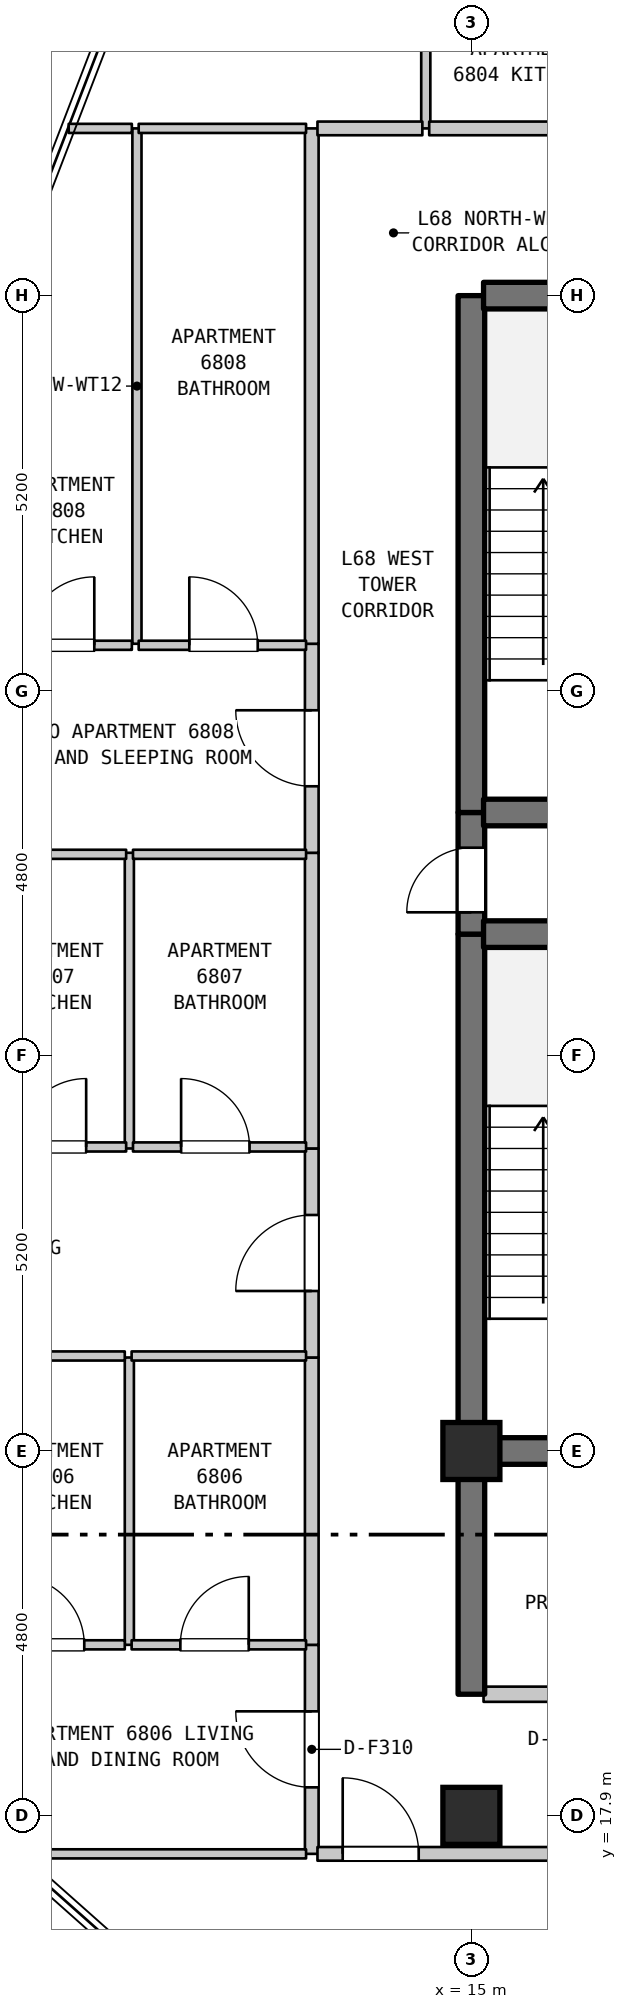
"""IFC4 building model, lengths in metres.
Left out: names, types, materials, properties, quantities, classifications, styles, units other than length and angle.
Written with IfcOpenShell. Run it as: python <this file> out.ifc"""

import sys

from ifc_helpers import new_model, si_unit, direction, frame, frame_2d, origin, origin_2d, place, context, subcontext, project, spatial, rectangle, extrude, element, fill, save


model = new_model("IFC4")
c1 = context("Model", 3, precision=1e-05, world=origin(), true_north=direction((0.0, 1.0)))
c2 = subcontext(c1, "Body", "Model", "MODEL_VIEW")
j1 = project(units=[si_unit("LENGTHUNIT", "METRE"), si_unit("PLANEANGLEUNIT", "RADIAN")], contexts=[c1])
p1 = place(None, origin())
s1 = spatial("IfcSite", under=j1, at=p1, CompositionType="ELEMENT")
p2 = place(p1, origin())
s2 = spatial("IfcBuilding", under=s1, at=p2, CompositionType="ELEMENT")
p3 = place(p2, frame((0.0, 0.0, 273.2)))
s3 = spatial("IfcBuildingStorey", under=s2, at=p3, CompositionType="ELEMENT", Elevation=273.2)
for number, where, z_axis, x_axis in (
    (1, (15.0, 17.9, 0.0), (0.0, 0.0, 1.0), (1.0, 0.0, 0.0)),
    (2, (15.0, 22.7, 0.0), (0.0, 0.0, 1.0), (1.0, 0.0, 0.0)),
):
    element("IfcColumn", number, at=place(p3, frame(where, z_axis=z_axis, x_axis=x_axis)), inside=s3, PredefinedType="COLUMN", context=c2, shape_type="SweptSolid", body=[
        extrude(rectangle(XDim=0.75, YDim=0.75, at=origin_2d()), origin(), (0.0, 0.0, 1.0), 3.7),
    ])
p4 = place(p3, frame((10.5, 20.15, 0.0), z_axis=(0.0, 0.0, 1.0), x_axis=(0.0, 1.0, 0.0)))
e3 = element("IfcWall", 3, at=p4, inside=s3, PredefinedType="PARTITIONING", context=c2, shape_type="SweptSolid", body=[
    extrude(rectangle(XDim=3.78, YDim=0.12, at=frame_2d((1.89, 0.0))), origin(), (0.0, 0.0, 1.0), 3.39),
])
p5 = place(p3, frame((10.5, 26.68, 0.0), z_axis=(0.0, 0.0, 1.0), x_axis=(0.0, 1.0, 0.0)))
e4 = element("IfcWall", 4, at=p5, inside=s3, PredefinedType="PARTITIONING", context=c2, shape_type="SweptSolid", body=[
    extrude(rectangle(XDim=3.89, YDim=0.12, at=frame_2d((1.945, 0.0))), origin(), (0.0, 0.0, 1.0), 3.39),
])
p6 = place(p3, frame((10.6, 33.32, 0.0), z_axis=(0.0, 0.0, 1.0), x_axis=(0.0, 1.0, 0.0)))
e5 = element("IfcWall", 5, at=p6, inside=s3, PredefinedType="PARTITIONING", context=c2, shape_type="SweptSolid", body=[
    extrude(rectangle(XDim=6.78, YDim=0.12, at=frame_2d((3.39, 0.0))), origin(), (0.0, 0.0, 1.0), 3.39),
])
p7 = place(p3, frame((12.9, 17.4, 0.0), z_axis=(0.0, 0.0, 1.0), x_axis=(0.0, 1.0, 0.0)))
e6 = element("IfcWall", 6, at=p7, inside=s3, PredefinedType="STANDARD", context=c2, shape_type="SweptSolid", body=[
    extrude(rectangle(XDim=2.75, YDim=0.18, at=frame_2d((1.375, 0.0))), origin(), (0.0, 0.0, 1.0), 3.39),
])
p8 = place(p7, frame((0.875, 0.0, 0.0)))
e7 = element("IfcOpeningElement", 7, at=p8, cuts=e6, PredefinedType="OPENING", context=c2, shape_type="SweptSolid", body=[
    extrude(rectangle(XDim=1.0, YDim=2.15, at=frame_2d((0.5, 1.075))), frame((0.0, 0.1, 0.0), z_axis=(0.0, -1.0, 0.0), x_axis=(1.0, 0.0, 0.0)), (0.0, 0.0, 1.0), 0.2),
])
p9 = place(p3, frame((12.9, 20.15, 0.0), z_axis=(0.0, 0.0, 1.0), x_axis=(0.0, 1.0, 0.0)))
e8 = element("IfcWall", 8, at=p9, inside=s3, PredefinedType="STANDARD", context=c2, shape_type="SweptSolid", body=[
    extrude(rectangle(XDim=3.78, YDim=0.18, at=frame_2d((1.89, 0.0))), origin(), (0.0, 0.0, 1.0), 3.39),
])
p10 = place(p3, frame((12.9, 23.93, 0.0), z_axis=(0.0, 0.0, 1.0), x_axis=(0.0, 1.0, 0.0)))
e9 = element("IfcWall", 9, at=p10, inside=s3, PredefinedType="STANDARD", context=c2, shape_type="SweptSolid", body=[
    extrude(rectangle(XDim=2.75, YDim=0.18, at=frame_2d((1.375, 0.0))), origin(), (0.0, 0.0, 1.0), 3.39),
])
p11 = place(p10, frame((0.875, 0.0, 0.0)))
e10 = element("IfcOpeningElement", 10, at=p11, cuts=e9, PredefinedType="OPENING", context=c2, shape_type="SweptSolid", body=[
    extrude(rectangle(XDim=1.0, YDim=2.15, at=frame_2d((0.5, 1.075))), frame((0.0, 0.1, 0.0), z_axis=(0.0, -1.0, 0.0), x_axis=(1.0, 0.0, 0.0)), (0.0, 0.0, 1.0), 0.2),
])
p12 = place(p3, frame((12.9, 26.68, 0.0), z_axis=(0.0, 0.0, 1.0), x_axis=(0.0, 1.0, 0.0)))
e11 = element("IfcWall", 11, at=p12, inside=s3, PredefinedType="STANDARD", context=c2, shape_type="SweptSolid", body=[
    extrude(rectangle(XDim=3.89, YDim=0.18, at=frame_2d((1.945, 0.0))), origin(), (0.0, 0.0, 1.0), 3.39),
])
p13 = place(p3, frame((12.9, 30.57, 0.0), z_axis=(0.0, 0.0, 1.0), x_axis=(0.0, 1.0, 0.0)))
e12 = element("IfcWall", 12, at=p13, inside=s3, PredefinedType="STANDARD", context=c2, shape_type="SweptSolid", body=[
    extrude(rectangle(XDim=2.75, YDim=0.18, at=frame_2d((1.375, 0.0))), origin(), (0.0, 0.0, 1.0), 3.39),
])
p14 = place(p13, frame((0.875, 0.0, 0.0)))
e13 = element("IfcOpeningElement", 13, at=p14, cuts=e12, PredefinedType="OPENING", context=c2, shape_type="SweptSolid", body=[
    extrude(rectangle(XDim=1.0, YDim=2.15, at=frame_2d((0.5, 1.075))), frame((0.0, 0.1, 0.0), z_axis=(0.0, -1.0, 0.0), x_axis=(1.0, 0.0, 0.0)), (0.0, 0.0, 1.0), 0.2),
])
p15 = place(p3, frame((12.9, 33.32, 0.0), z_axis=(0.0, 0.0, 1.0), x_axis=(0.0, 1.0, 0.0)))
e14 = element("IfcWall", 14, at=p15, inside=s3, PredefinedType="STANDARD", context=c2, shape_type="SweptSolid", body=[
    extrude(rectangle(XDim=6.78, YDim=0.18, at=frame_2d((3.39, 0.0))), origin(), (0.0, 0.0, 1.0), 3.39),
])
p16 = place(p3, frame((14.4, 40.1, 0.0), z_axis=(0.0, 0.0, 1.0), x_axis=(0.0, 1.0, 0.0)))
e15 = element("IfcWall", 15, at=p16, inside=s3, PredefinedType="PARTITIONING", context=c2, shape_type="SweptSolid", body=[
    extrude(rectangle(XDim=2.3, YDim=0.12, at=frame_2d((1.15, 0.0))), origin(), (0.0, 0.0, 1.0), 3.39),
])
p17 = place(p3, frame((15.0, 19.5, 0.0), z_axis=(0.0, 0.0, 1.0), x_axis=(0.0, 1.0, 0.0)))
e16 = element("IfcWall", 16, at=p17, inside=s3, PredefinedType="SHEAR", context=c2, shape_type="SweptSolid", body=[
    extrude(rectangle(XDim=3.2, YDim=0.35, at=frame_2d((1.6, 0.0))), origin(), (0.0, 0.0, 1.0), 3.39),
])
p18 = place(p3, frame((15.0, 22.7, 0.0), z_axis=(0.0, 0.0, 1.0), x_axis=(0.0, 1.0, 0.0)))
e17 = element("IfcWall", 17, at=p18, inside=s3, PredefinedType="SHEAR", context=c2, shape_type="SweptSolid", body=[
    extrude(rectangle(XDim=6.8, YDim=0.35, at=frame_2d((3.4, 0.0))), origin(), (0.0, 0.0, 1.0), 3.39),
])
p19 = place(p3, frame((15.0, 29.5, 0.0), z_axis=(0.0, 0.0, 1.0), x_axis=(0.0, 1.0, 0.0)))
e18 = element("IfcWall", 18, at=p19, inside=s3, PredefinedType="SHEAR", context=c2, shape_type="SweptSolid", body=[
    extrude(rectangle(XDim=1.6, YDim=0.35, at=frame_2d((0.8, 0.0))), origin(), (0.0, 0.0, 1.0), 3.39),
])
p20 = place(p19, frame((0.287, 0.0, 0.0)))
e19 = element("IfcOpeningElement", 19, at=p20, cuts=e18, PredefinedType="OPENING", context=c2, shape_type="SweptSolid", body=[
    extrude(rectangle(XDim=0.85, YDim=2.1, at=frame_2d((0.425, 1.05))), frame((0.0, 0.185, 0.0), z_axis=(0.0, -1.0, 0.0), x_axis=(1.0, 0.0, 0.0)), (0.0, 0.0, 1.0), 0.37),
])
p21 = place(p3, frame((15.0, 31.1, 0.0), z_axis=(0.0, 0.0, 1.0), x_axis=(0.0, 1.0, 0.0)))
e20 = element("IfcWall", 20, at=p21, inside=s3, PredefinedType="SHEAR", context=c2, shape_type="SweptSolid", body=[
    extrude(rectangle(XDim=6.8, YDim=0.35, at=frame_2d((3.4, 0.0))), origin(), (0.0, 0.0, 1.0), 3.39),
])
p22 = place(p3, frame((8.973, 17.4, 0.0), z_axis=(0.0, 0.0, 1.0), x_axis=(1.0, 0.0, 0.0)))
e21 = element("IfcWall", 21, at=p22, inside=s3, PredefinedType="PARTITIONING", context=c2, shape_type="SweptSolid", body=[
    extrude(rectangle(XDim=3.852, YDim=0.12, at=frame_2d((1.926, 0.0))), origin(), (0.0, 0.0, 1.0), 3.39),
])
p23 = place(p3, frame((12.975, 17.4, 0.0), z_axis=(0.0, 0.0, 1.0), x_axis=(1.0, 0.0, 0.0)))
e22 = element("IfcWall", 22, at=p23, inside=s3, PredefinedType="STANDARD", context=c2, shape_type="SweptSolid", body=[
    extrude(rectangle(XDim=3.18, YDim=0.18, at=frame_2d((1.59, 0.0))), origin(), (0.0, 0.0, 1.0), 3.39),
])
p24 = place(p23, frame((0.332, 0.0, 0.0)))
e23 = element("IfcOpeningElement", 23, at=p24, cuts=e22, PredefinedType="OPENING", context=c2, shape_type="SweptSolid", body=[
    extrude(rectangle(XDim=1.0, YDim=2.15, at=frame_2d((0.5, 1.075))), frame((0.0, 0.1, 0.0), z_axis=(0.0, -1.0, 0.0), x_axis=(1.0, 0.0, 0.0)), (0.0, 0.0, 1.0), 0.2),
])
p25 = place(p3, frame((15.16, 19.5, 0.0), z_axis=(0.0, 0.0, 1.0), x_axis=(1.0, 0.0, 0.0)))
e24 = element("IfcWall", 24, at=p25, inside=s3, PredefinedType="STANDARD", context=c2, shape_type="SweptSolid", body=[
    extrude(rectangle(XDim=3.68, YDim=0.2, at=frame_2d((1.84, 0.0))), origin(), (0.0, 0.0, 1.0), 3.39),
])
p26 = place(p25, frame((1.39, 0.0, 0.0)))
e25 = element("IfcOpeningElement", 25, at=p26, cuts=e24, PredefinedType="OPENING", context=c2, shape_type="SweptSolid", body=[
    extrude(rectangle(XDim=0.9, YDim=2.15, at=frame_2d((0.45, 1.075))), frame((0.0, 0.11, 0.0), z_axis=(0.0, -1.0, 0.0), x_axis=(1.0, 0.0, 0.0)), (0.0, 0.0, 1.0), 0.22),
])
p27 = place(p3, frame((8.473, 20.15, 0.0), z_axis=(0.0, 0.0, 1.0), x_axis=(1.0, 0.0, 0.0)))
e26 = element("IfcWall", 26, at=p27, inside=s3, PredefinedType="PARTITIONING", context=c2, shape_type="SweptSolid", body=[
    extrude(rectangle(XDim=1.967, YDim=0.12, at=frame_2d((0.983, 0.0))), origin(), (0.0, 0.0, 1.0), 3.39),
])
p28 = place(p27, frame((0.534, 0.0, 0.0)))
e27 = element("IfcOpeningElement", 27, at=p28, cuts=e26, PredefinedType="OPENING", context=c2, shape_type="SweptSolid", body=[
    extrude(rectangle(XDim=0.9, YDim=2.15, at=frame_2d((0.45, 1.075))), frame((0.0, 0.07, 0.0), z_axis=(0.0, -1.0, 0.0), x_axis=(1.0, 0.0, 0.0)), (0.0, 0.0, 1.0), 0.14),
])
p29 = place(p3, frame((10.53, 20.15, 0.0), z_axis=(0.0, 0.0, 1.0), x_axis=(1.0, 0.0, 0.0)))
e28 = element("IfcWall", 28, at=p29, inside=s3, PredefinedType="PARTITIONING", context=c2, shape_type="SweptSolid", body=[
    extrude(rectangle(XDim=2.295, YDim=0.12, at=frame_2d((1.147, 0.0))), origin(), (0.0, 0.0, 1.0), 3.39),
])
p30 = place(p29, frame((0.641, 0.0, 0.0)))
e29 = element("IfcOpeningElement", 29, at=p30, cuts=e28, PredefinedType="OPENING", context=c2, shape_type="SweptSolid", body=[
    extrude(rectangle(XDim=0.9, YDim=2.1, at=frame_2d((0.45, 1.05))), frame((0.0, 0.07, 0.0), z_axis=(0.0, -1.0, 0.0), x_axis=(1.0, 0.0, 0.0)), (0.0, 0.0, 1.0), 0.14),
])
p31 = place(p3, frame((15.16, 22.7, 0.0), z_axis=(0.0, 0.0, 1.0), x_axis=(1.0, 0.0, 0.0)))
e30 = element("IfcWall", 30, at=p31, inside=s3, PredefinedType="SHEAR", context=c2, shape_type="SweptSolid", body=[
    extrude(rectangle(XDim=3.68, YDim=0.35, at=frame_2d((1.84, 0.0))), origin(), (0.0, 0.0, 1.0), 3.39),
])
p32 = place(p3, frame((8.473, 23.95, 0.0), z_axis=(0.0, 0.0, 1.0), x_axis=(1.0, 0.0, 0.0)))
e31 = element("IfcWall", 31, at=p32, inside=s3, PredefinedType="PARTITIONING", context=c2, shape_type="SweptSolid", body=[
    extrude(rectangle(XDim=1.967, YDim=0.12, at=frame_2d((0.983, 0.0))), origin(), (0.0, 0.0, 1.0), 3.39),
])
p33 = place(p3, frame((10.53, 23.95, 0.0), z_axis=(0.0, 0.0, 1.0), x_axis=(1.0, 0.0, 0.0)))
e32 = element("IfcWall", 32, at=p33, inside=s3, PredefinedType="PARTITIONING", context=c2, shape_type="SweptSolid", body=[
    extrude(rectangle(XDim=2.295, YDim=0.12, at=frame_2d((1.147, 0.0))), origin(), (0.0, 0.0, 1.0), 3.39),
])
p34 = place(p3, frame((8.506, 26.7, 0.0), z_axis=(0.0, 0.0, 1.0), x_axis=(1.0, 0.0, 0.0)))
e33 = element("IfcWall", 33, at=p34, inside=s3, PredefinedType="PARTITIONING", context=c2, shape_type="SweptSolid", body=[
    extrude(rectangle(XDim=1.952, YDim=0.12, at=frame_2d((0.976, 0.0))), origin(), (0.0, 0.0, 1.0), 3.39),
])
p35 = place(p34, frame((0.526, 0.0, 0.0)))
e34 = element("IfcOpeningElement", 34, at=p35, cuts=e33, PredefinedType="OPENING", context=c2, shape_type="SweptSolid", body=[
    extrude(rectangle(XDim=0.9, YDim=2.15, at=frame_2d((0.45, 1.075))), frame((0.0, 0.07, 0.0), z_axis=(0.0, -1.0, 0.0), x_axis=(1.0, 0.0, 0.0)), (0.0, 0.0, 1.0), 0.14),
])
p36 = place(p3, frame((10.548, 26.7, 0.0), z_axis=(0.0, 0.0, 1.0), x_axis=(1.0, 0.0, 0.0)))
e35 = element("IfcWall", 35, at=p36, inside=s3, PredefinedType="PARTITIONING", context=c2, shape_type="SweptSolid", body=[
    extrude(rectangle(XDim=2.277, YDim=0.12, at=frame_2d((1.138, 0.0))), origin(), (0.0, 0.0, 1.0), 3.39),
])
p37 = place(p36, frame((0.633, 0.0, 0.0)))
e36 = element("IfcOpeningElement", 36, at=p37, cuts=e35, PredefinedType="OPENING", context=c2, shape_type="SweptSolid", body=[
    extrude(rectangle(XDim=0.9, YDim=2.1, at=frame_2d((0.45, 1.05))), frame((0.0, 0.07, 0.0), z_axis=(0.0, -1.0, 0.0), x_axis=(1.0, 0.0, 0.0)), (0.0, 0.0, 1.0), 0.14),
])
p38 = place(p3, frame((15.16, 29.5, 0.0), z_axis=(0.0, 0.0, 1.0), x_axis=(1.0, 0.0, 0.0)))
e37 = element("IfcWall", 37, at=p38, inside=s3, PredefinedType="SHEAR", context=c2, shape_type="SweptSolid", body=[
    extrude(rectangle(XDim=3.68, YDim=0.35, at=frame_2d((1.84, 0.0))), origin(), (0.0, 0.0, 1.0), 3.39),
])
p39 = place(p3, frame((8.506, 30.55, 0.0), z_axis=(0.0, 0.0, 1.0), x_axis=(1.0, 0.0, 0.0)))
e38 = element("IfcWall", 38, at=p39, inside=s3, PredefinedType="PARTITIONING", context=c2, shape_type="SweptSolid", body=[
    extrude(rectangle(XDim=1.952, YDim=0.12, at=frame_2d((0.976, 0.0))), origin(), (0.0, 0.0, 1.0), 3.39),
])
p40 = place(p3, frame((10.548, 30.55, 0.0), z_axis=(0.0, 0.0, 1.0), x_axis=(1.0, 0.0, 0.0)))
e39 = element("IfcWall", 39, at=p40, inside=s3, PredefinedType="PARTITIONING", context=c2, shape_type="SweptSolid", body=[
    extrude(rectangle(XDim=2.277, YDim=0.12, at=frame_2d((1.138, 0.0))), origin(), (0.0, 0.0, 1.0), 3.39),
])
p41 = place(p3, frame((15.16, 31.1, 0.0), z_axis=(0.0, 0.0, 1.0), x_axis=(1.0, 0.0, 0.0)))
e40 = element("IfcWall", 40, at=p41, inside=s3, PredefinedType="SHEAR", context=c2, shape_type="SweptSolid", body=[
    extrude(rectangle(XDim=3.68, YDim=0.35, at=frame_2d((1.84, 0.0))), origin(), (0.0, 0.0, 1.0), 3.39),
])
p42 = place(p3, frame((8.645, 33.3, 0.0), z_axis=(0.0, 0.0, 1.0), x_axis=(1.0, 0.0, 0.0)))
e41 = element("IfcWall", 41, at=p42, inside=s3, PredefinedType="PARTITIONING", context=c2, shape_type="SweptSolid", body=[
    extrude(rectangle(XDim=1.888, YDim=0.12, at=frame_2d((0.944, 0.0))), origin(), (0.0, 0.0, 1.0), 3.39),
])
p43 = place(p42, frame((0.494, 0.0, 0.0)))
e42 = element("IfcOpeningElement", 42, at=p43, cuts=e41, PredefinedType="OPENING", context=c2, shape_type="SweptSolid", body=[
    extrude(rectangle(XDim=0.9, YDim=2.15, at=frame_2d((0.45, 1.075))), frame((0.0, 0.07, 0.0), z_axis=(0.0, -1.0, 0.0), x_axis=(1.0, 0.0, 0.0)), (0.0, 0.0, 1.0), 0.14),
])
p44 = place(p3, frame((10.623, 33.3, 0.0), z_axis=(0.0, 0.0, 1.0), x_axis=(1.0, 0.0, 0.0)))
e43 = element("IfcWall", 43, at=p44, inside=s3, PredefinedType="PARTITIONING", context=c2, shape_type="SweptSolid", body=[
    extrude(rectangle(XDim=2.202, YDim=0.12, at=frame_2d((1.101, 0.0))), origin(), (0.0, 0.0, 1.0), 3.39),
])
p45 = place(p44, frame((0.666, 0.0, 0.0)))
e44 = element("IfcOpeningElement", 44, at=p45, cuts=e43, PredefinedType="OPENING", context=c2, shape_type="SweptSolid", body=[
    extrude(rectangle(XDim=0.9, YDim=2.1, at=frame_2d((0.45, 1.05))), frame((0.0, 0.07, 0.0), z_axis=(0.0, -1.0, 0.0), x_axis=(1.0, 0.0, 0.0)), (0.0, 0.0, 1.0), 0.14),
])
p46 = place(p3, frame((15.16, 37.9, 0.0), z_axis=(0.0, 0.0, 1.0), x_axis=(1.0, 0.0, 0.0)))
e45 = element("IfcWall", 45, at=p46, inside=s3, PredefinedType="SHEAR", context=c2, shape_type="SweptSolid", body=[
    extrude(rectangle(XDim=3.68, YDim=0.35, at=frame_2d((1.84, 0.0))), origin(), (0.0, 0.0, 1.0), 3.39),
])
p47 = place(p3, frame((9.702, 40.1, 0.0), z_axis=(0.0, 0.0, 1.0), x_axis=(1.0, 0.0, 0.0)))
e46 = element("IfcWall", 46, at=p47, inside=s3, PredefinedType="PARTITIONING", context=c2, shape_type="SweptSolid", body=[
    extrude(rectangle(XDim=0.831, YDim=0.12, at=frame_2d((0.416, 0.0))), origin(), (0.0, 0.0, 1.0), 3.39),
])
p48 = place(p3, frame((10.623, 40.1, 0.0), z_axis=(0.0, 0.0, 1.0), x_axis=(1.0, 0.0, 0.0)))
e47 = element("IfcWall", 47, at=p48, inside=s3, PredefinedType="PARTITIONING", context=c2, shape_type="SweptSolid", body=[
    extrude(rectangle(XDim=2.202, YDim=0.12, at=frame_2d((1.101, 0.0))), origin(), (0.0, 0.0, 1.0), 3.39),
])
p49 = place(p3, frame((12.975, 40.1, 0.0), z_axis=(0.0, 0.0, 1.0), x_axis=(1.0, 0.0, 0.0)))
e48 = element("IfcWall", 48, at=p49, inside=s3, PredefinedType="STANDARD", context=c2, shape_type="SweptSolid", body=[
    extrude(rectangle(XDim=1.38, YDim=0.18, at=frame_2d((0.69, 0.0))), origin(), (0.0, 0.0, 1.0), 3.39),
])
p50 = place(p3, frame((14.445, 40.1, 0.0), z_axis=(0.0, 0.0, 1.0), x_axis=(1.0, 0.0, 0.0)))
e49 = element("IfcWall", 49, at=p50, inside=s3, PredefinedType="STANDARD", context=c2, shape_type="SweptSolid", body=[
    extrude(rectangle(XDim=2.476, YDim=0.18, at=frame_2d((1.238, 0.0))), origin(), (0.0, 0.0, 1.0), 3.39),
])
p51 = place(p8, origin())
e50 = element("IfcDoor", 50, at=p51, inside=s3, OperationType="SINGLE_SWING_RIGHT", PredefinedType="DOOR", context=c2, shape_type="SweptSolid", body=[
    extrude(rectangle(XDim=1.0, YDim=2.15, at=frame_2d((0.5, 1.075))), frame((0.0, 0.025, 0.0), z_axis=(0.0, -1.0, 0.0), x_axis=(1.0, 0.0, 0.0)), (0.0, 0.0, 1.0), 0.05),
])
fill(e7, e50)
p52 = place(p11, origin())
e51 = element("IfcDoor", 51, at=p52, inside=s3, OperationType="SINGLE_SWING_LEFT", PredefinedType="DOOR", context=c2, shape_type="SweptSolid", body=[
    extrude(rectangle(XDim=1.0, YDim=2.15, at=frame_2d((0.5, 1.075))), frame((0.0, 0.025, 0.0), z_axis=(0.0, -1.0, 0.0), x_axis=(1.0, 0.0, 0.0)), (0.0, 0.0, 1.0), 0.05),
])
fill(e10, e51)
p53 = place(p14, origin())
e52 = element("IfcDoor", 52, at=p53, inside=s3, OperationType="SINGLE_SWING_RIGHT", PredefinedType="DOOR", context=c2, shape_type="SweptSolid", body=[
    extrude(rectangle(XDim=1.0, YDim=2.15, at=frame_2d((0.5, 1.075))), frame((0.0, 0.025, 0.0), z_axis=(0.0, -1.0, 0.0), x_axis=(1.0, 0.0, 0.0)), (0.0, 0.0, 1.0), 0.05),
])
fill(e13, e52)
p54 = place(p20, origin())
e53 = element("IfcDoor", 53, at=p54, inside=s3, OperationType="SINGLE_SWING_LEFT", PredefinedType="DOOR", context=c2, shape_type="SweptSolid", body=[
    extrude(rectangle(XDim=0.85, YDim=2.1, at=frame_2d((0.425, 1.05))), frame((0.0, 0.025, 0.0), z_axis=(0.0, -1.0, 0.0), x_axis=(1.0, 0.0, 0.0)), (0.0, 0.0, 1.0), 0.05),
])
fill(e19, e53)
p55 = place(p24, origin())
e54 = element("IfcDoor", 54, at=p55, inside=s3, OperationType="SINGLE_SWING_LEFT", PredefinedType="DOOR", context=c2, shape_type="SweptSolid", body=[
    extrude(rectangle(XDim=1.0, YDim=2.15, at=frame_2d((0.5, 1.075))), frame((0.0, 0.025, 0.0), z_axis=(0.0, -1.0, 0.0), x_axis=(1.0, 0.0, 0.0)), (0.0, 0.0, 1.0), 0.05),
])
fill(e23, e54)
p56 = place(p28, origin())
e55 = element("IfcDoor", 55, at=p56, inside=s3, OperationType="SINGLE_SWING_LEFT", PredefinedType="DOOR", context=c2, shape_type="SweptSolid", body=[
    extrude(rectangle(XDim=0.9, YDim=2.15, at=frame_2d((0.45, 1.075))), frame((0.0, 0.025, 0.0), z_axis=(0.0, -1.0, 0.0), x_axis=(1.0, 0.0, 0.0)), (0.0, 0.0, 1.0), 0.05),
])
fill(e27, e55)
p57 = place(p30, origin())
e56 = element("IfcDoor", 56, at=p57, inside=s3, OperationType="SINGLE_SWING_RIGHT", PredefinedType="DOOR", context=c2, shape_type="SweptSolid", body=[
    extrude(rectangle(XDim=0.9, YDim=2.1, at=frame_2d((0.45, 1.05))), frame((0.0, 0.025, 0.0), z_axis=(0.0, -1.0, 0.0), x_axis=(1.0, 0.0, 0.0)), (0.0, 0.0, 1.0), 0.05),
])
fill(e29, e56)
p58 = place(p35, origin())
e57 = element("IfcDoor", 57, at=p58, inside=s3, OperationType="SINGLE_SWING_RIGHT", PredefinedType="DOOR", context=c2, shape_type="SweptSolid", body=[
    extrude(rectangle(XDim=0.9, YDim=2.15, at=frame_2d((0.45, 1.075))), frame((0.0, 0.025, 0.0), z_axis=(0.0, -1.0, 0.0), x_axis=(1.0, 0.0, 0.0)), (0.0, 0.0, 1.0), 0.05),
])
fill(e34, e57)
p59 = place(p37, origin())
e58 = element("IfcDoor", 58, at=p59, inside=s3, OperationType="SINGLE_SWING_LEFT", PredefinedType="DOOR", context=c2, shape_type="SweptSolid", body=[
    extrude(rectangle(XDim=0.9, YDim=2.1, at=frame_2d((0.45, 1.05))), frame((0.0, 0.025, 0.0), z_axis=(0.0, -1.0, 0.0), x_axis=(1.0, 0.0, 0.0)), (0.0, 0.0, 1.0), 0.05),
])
fill(e36, e58)
p60 = place(p43, origin())
e59 = element("IfcDoor", 59, at=p60, inside=s3, OperationType="SINGLE_SWING_RIGHT", PredefinedType="DOOR", context=c2, shape_type="SweptSolid", body=[
    extrude(rectangle(XDim=0.9, YDim=2.15, at=frame_2d((0.45, 1.075))), frame((0.0, 0.025, 0.0), z_axis=(0.0, -1.0, 0.0), x_axis=(1.0, 0.0, 0.0)), (0.0, 0.0, 1.0), 0.05),
])
fill(e42, e59)
p61 = place(p45, origin())
e60 = element("IfcDoor", 60, at=p61, inside=s3, OperationType="SINGLE_SWING_LEFT", PredefinedType="DOOR", context=c2, shape_type="SweptSolid", body=[
    extrude(rectangle(XDim=0.9, YDim=2.1, at=frame_2d((0.45, 1.05))), frame((0.0, 0.025, 0.0), z_axis=(0.0, -1.0, 0.0), x_axis=(1.0, 0.0, 0.0)), (0.0, 0.0, 1.0), 0.05),
])
fill(e44, e60)
save(model, sys.argv[1])
